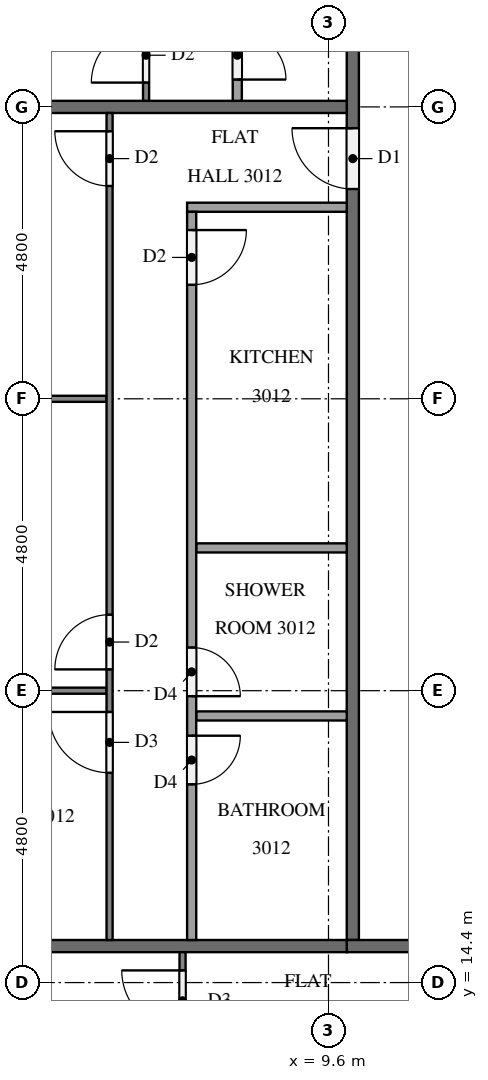
"""IFC4 building model, lengths in metres.
Left out: names, types, materials, properties, quantities, classifications, styles, units other than length and angle.
Written with IfcOpenShell. Run it as: python <this file> out.ifc"""

import sys

from ifc_helpers import new_model, si_unit, direction, frame, frame_2d, origin, place, context, subcontext, project, spatial, rectangle, extrude, element, fill, save


model = new_model("IFC4")
c1 = context("Model", 3, precision=1e-05, world=origin(), true_north=direction((0.0, 1.0)))
c2 = subcontext(c1, "Body", "Model", "MODEL_VIEW")
j1 = project(units=[si_unit("LENGTHUNIT", "METRE"), si_unit("PLANEANGLEUNIT", "RADIAN")], contexts=[c1])
p1 = place(None, origin())
s1 = spatial("IfcSite", under=j1, at=p1, CompositionType="ELEMENT")
p2 = place(p1, origin())
s2 = spatial("IfcBuilding", under=s1, at=p2, CompositionType="ELEMENT")
p3 = place(p2, frame((0.0, 0.0, 119.1)))
s3 = spatial("IfcBuildingStorey", under=s2, at=p3, CompositionType="ELEMENT", Elevation=119.1)
p4 = place(p3, frame((10.0, 15.1, 0.0), z_axis=(0.0, 0.0, 1.0), x_axis=(0.0, 1.0, 0.0)))
e1 = element("IfcWall", 1, at=p4, inside=s3, PredefinedType="PARTITIONING", context=c2, shape_type="SweptSolid", body=[
    extrude(rectangle(XDim=22.6, YDim=0.2, at=frame_2d((11.3, 0.0))), origin(), (0.0, 0.0, 1.0), 3.2),
])
p5 = place(p4, frame((21.35, 0.0, 0.0)))
e2 = element("IfcOpeningElement", 2, at=p5, cuts=e1, PredefinedType="OPENING", context=c2, shape_type="SweptSolid", body=[
    extrude(rectangle(XDim=1.0, YDim=2.1, at=frame_2d((0.5, 1.05))), frame((0.0, 0.11, 0.0), z_axis=(0.0, -1.0, 0.0), x_axis=(1.0, 0.0, 0.0)), (0.0, 0.0, 1.0), 0.22),
])
p6 = place(p4, frame((12.35, 0.0, 0.0)))
e3 = element("IfcOpeningElement", 3, at=p6, cuts=e1, PredefinedType="OPENING", context=c2, shape_type="SweptSolid", body=[
    extrude(rectangle(XDim=1.0, YDim=2.1, at=frame_2d((0.5, 1.05))), frame((0.0, 0.11, 0.0), z_axis=(0.0, -1.0, 0.0), x_axis=(1.0, 0.0, 0.0)), (0.0, 0.0, 1.0), 0.22),
])
p7 = place(p3, frame((9.9, 15.0, 0.0), z_axis=(0.0, 0.0, 1.0), x_axis=(1.0, 0.0, 0.0)))
e4 = element("IfcWall", 4, at=p7, inside=s3, PredefinedType="PARTITIONING", context=c2, shape_type="SweptSolid", body=[
    extrude(rectangle(XDim=2.2, YDim=0.2, at=frame_2d((1.1, 0.0))), origin(), (0.0, 0.0, 1.0), 3.2),
])
p8 = place(p3, frame((0.375, 28.8, 0.0), z_axis=(0.0, 0.0, 1.0), x_axis=(1.0, 0.0, 0.0)))
e5 = element("IfcWall", 5, at=p8, inside=s3, PredefinedType="PARTITIONING", context=c2, shape_type="SweptSolid", body=[
    extrude(rectangle(XDim=9.525, YDim=0.2, at=frame_2d((4.762, 0.0))), origin(), (0.0, 0.0, 1.0), 3.2),
])
p9 = place(p3, frame((0.1, 15.0, 0.0), z_axis=(0.0, 0.0, 1.0), x_axis=(1.0, 0.0, 0.0)))
e6 = element("IfcWall", 6, at=p9, inside=s3, PredefinedType="PARTITIONING", context=c2, shape_type="SweptSolid", body=[
    extrude(rectangle(XDim=9.8, YDim=0.2, at=frame_2d((4.9, 0.0))), origin(), (0.0, 0.0, 1.0), 3.2),
])
p10 = place(p3, frame((6.6, 28.9, 0.0), z_axis=(0.0, 0.0, 1.0), x_axis=(0.0, 1.0, 0.0)))
e7 = element("IfcWall", 7, at=p10, inside=s3, PredefinedType="PARTITIONING", context=c2, shape_type="SweptSolid", body=[
    extrude(rectangle(XDim=8.8, YDim=0.1, at=frame_2d((4.4, 0.0))), origin(), (0.0, 0.0, 1.0), 3.2),
])
p11 = place(p10, frame((7.5, 0.0, 0.0)))
e8 = element("IfcOpeningElement", 8, at=p11, cuts=e7, PredefinedType="OPENING", context=c2, shape_type="SweptSolid", body=[
    extrude(rectangle(XDim=1.0, YDim=2.1, at=frame_2d((0.5, 1.05))), frame((0.0, 0.06, 0.0), z_axis=(0.0, -1.0, 0.0), x_axis=(1.0, 0.0, 0.0)), (0.0, 0.0, 1.0), 0.12),
])
p12 = place(p10, frame((0.3, 0.0, 0.0)))
e9 = element("IfcOpeningElement", 9, at=p12, cuts=e7, PredefinedType="OPENING", context=c2, shape_type="SweptSolid", body=[
    extrude(rectangle(XDim=0.9, YDim=2.1, at=frame_2d((0.45, 1.05))), frame((0.0, 0.06, 0.0), z_axis=(0.0, -1.0, 0.0), x_axis=(1.0, 0.0, 0.0)), (0.0, 0.0, 1.0), 0.12),
])
p13 = place(p3, frame((8.1, 36.075, 0.0), z_axis=(0.0, 0.0, 1.0), x_axis=(0.0, -1.0, 0.0)))
e10 = element("IfcWall", 10, at=p13, inside=s3, PredefinedType="PARTITIONING", context=c2, shape_type="SweptSolid", body=[
    extrude(rectangle(XDim=7.175, YDim=0.15, at=frame_2d((3.587, 0.0))), origin(), (0.0, 0.0, 1.0), 3.2),
])
p14 = place(p13, frame((0.3, 0.0, 0.0)))
e11 = element("IfcOpeningElement", 11, at=p14, cuts=e10, PredefinedType="OPENING", context=c2, shape_type="SweptSolid", body=[
    extrude(rectangle(XDim=0.9, YDim=2.1, at=frame_2d((0.45, 1.05))), frame((0.0, 0.085, 0.0), z_axis=(0.0, -1.0, 0.0), x_axis=(1.0, 0.0, 0.0)), (0.0, 0.0, 1.0), 0.17),
])
p15 = place(p13, frame((6.025, 0.0, 0.0)))
e12 = element("IfcOpeningElement", 12, at=p15, cuts=e10, PredefinedType="OPENING", context=c2, shape_type="SweptSolid", body=[
    extrude(rectangle(XDim=0.8, YDim=2.1, at=frame_2d((0.4, 1.05))), frame((0.0, 0.085, 0.0), z_axis=(0.0, -1.0, 0.0), x_axis=(1.0, 0.0, 0.0)), (0.0, 0.0, 1.0), 0.17),
])
p16 = place(p3, frame((5.95, 24.0, 0.0), z_axis=(0.0, 0.0, 1.0), x_axis=(-1.0, 0.0, 0.0)))
e13 = element("IfcWall", 13, at=p16, inside=s3, PredefinedType="PARTITIONING", context=c2, shape_type="SweptSolid", body=[
    extrude(rectangle(XDim=5.85, YDim=0.1, at=frame_2d((2.925, 0.0))), origin(), (0.0, 0.0, 1.0), 3.2),
])
p17 = place(p3, frame((5.95, 19.2, 0.0), z_axis=(0.0, 0.0, 1.0), x_axis=(-1.0, 0.0, 0.0)))
e14 = element("IfcWall", 14, at=p17, inside=s3, PredefinedType="PARTITIONING", context=c2, shape_type="SweptSolid", body=[
    extrude(rectangle(XDim=5.575, YDim=0.1, at=frame_2d((2.788, 0.0))), origin(), (0.0, 0.0, 1.0), 3.2),
])
p18 = place(p3, frame((6.0, 15.1, 0.0), z_axis=(0.0, 0.0, 1.0), x_axis=(0.0, 1.0, 0.0)))
e15 = element("IfcWall", 15, at=p18, inside=s3, PredefinedType="PARTITIONING", context=c2, shape_type="SweptSolid", body=[
    extrude(rectangle(XDim=13.6, YDim=0.1, at=frame_2d((6.8, 0.0))), origin(), (0.0, 0.0, 1.0), 3.2),
])
p19 = place(p18, frame((12.4, 0.0, 0.0)))
e16 = element("IfcOpeningElement", 16, at=p19, cuts=e15, PredefinedType="OPENING", context=c2, shape_type="SweptSolid", body=[
    extrude(rectangle(XDim=0.9, YDim=2.1, at=frame_2d((0.45, 1.05))), frame((0.0, 0.06, 0.0), z_axis=(0.0, -1.0, 0.0), x_axis=(1.0, 0.0, 0.0)), (0.0, 0.0, 1.0), 0.12),
])
p20 = place(p18, frame((4.45, 0.0, 0.0)))
e17 = element("IfcOpeningElement", 17, at=p20, cuts=e15, PredefinedType="OPENING", context=c2, shape_type="SweptSolid", body=[
    extrude(rectangle(XDim=0.9, YDim=2.1, at=frame_2d((0.45, 1.05))), frame((0.0, 0.06, 0.0), z_axis=(0.0, -1.0, 0.0), x_axis=(1.0, 0.0, 0.0)), (0.0, 0.0, 1.0), 0.12),
])
p21 = place(p18, frame((2.75, 0.0, 0.0)))
e18 = element("IfcOpeningElement", 18, at=p21, cuts=e15, PredefinedType="OPENING", context=c2, shape_type="SweptSolid", body=[
    extrude(rectangle(XDim=1.0, YDim=2.1, at=frame_2d((0.5, 1.05))), frame((0.0, 0.06, 0.0), z_axis=(0.0, -1.0, 0.0), x_axis=(1.0, 0.0, 0.0)), (0.0, 0.0, 1.0), 0.12),
])
for number, where, z_axis, x_axis in (
    (19, (9.9, 21.548, 0.0), (0.0, 0.0, 1.0), (-1.0, 0.0, 0.0)),
    (20, (9.9, 18.785, 0.0), (0.0, 0.0, 1.0), (-1.0, 0.0, 0.0)),
):
    element("IfcWall", number, at=place(p3, frame(where, z_axis=z_axis, x_axis=x_axis)), inside=s3, PredefinedType="PARTITIONING", context=c2, shape_type="SweptSolid", body=[
        extrude(rectangle(XDim=2.475, YDim=0.15, at=frame_2d((1.237, 0.0))), origin(), (0.0, 0.0, 1.0), 3.2),
    ])
p22 = place(p3, frame((9.9, 27.15, 0.0), z_axis=(0.0, 0.0, 1.0), x_axis=(-1.0, 0.0, 0.0)))
e21 = element("IfcWall", 21, at=p22, inside=s3, PredefinedType="PARTITIONING", context=c2, shape_type="SweptSolid", body=[
    extrude(rectangle(XDim=2.625, YDim=0.15, at=frame_2d((1.312, 0.0))), origin(), (0.0, 0.0, 1.0), 3.2),
])
p23 = place(p3, frame((7.35, 27.075, 0.0), z_axis=(0.0, 0.0, 1.0), x_axis=(0.0, -1.0, 0.0)))
e22 = element("IfcWall", 22, at=p23, inside=s3, PredefinedType="PARTITIONING", context=c2, shape_type="SweptSolid", body=[
    extrude(rectangle(XDim=11.975, YDim=0.15, at=frame_2d((5.987, 0.0))), origin(), (0.0, 0.0, 1.0), 3.2),
])
p24 = place(p23, frame((0.3, 0.0, 0.0)))
e23 = element("IfcOpeningElement", 23, at=p24, cuts=e22, PredefinedType="OPENING", context=c2, shape_type="SweptSolid", body=[
    extrude(rectangle(XDim=0.9, YDim=2.1, at=frame_2d((0.45, 1.05))), frame((0.0, 0.085, 0.0), z_axis=(0.0, -1.0, 0.0), x_axis=(1.0, 0.0, 0.0)), (0.0, 0.0, 1.0), 0.17),
])
p25 = place(p23, frame((7.165, 0.0, 0.0)))
e24 = element("IfcOpeningElement", 24, at=p25, cuts=e22, PredefinedType="OPENING", context=c2, shape_type="SweptSolid", body=[
    extrude(rectangle(XDim=0.8, YDim=2.1, at=frame_2d((0.4, 1.05))), frame((0.0, 0.085, 0.0), z_axis=(0.0, -1.0, 0.0), x_axis=(1.0, 0.0, 0.0)), (0.0, 0.0, 1.0), 0.17),
])
p26 = place(p23, frame((8.615, 0.0, 0.0)))
e25 = element("IfcOpeningElement", 25, at=p26, cuts=e22, PredefinedType="OPENING", context=c2, shape_type="SweptSolid", body=[
    extrude(rectangle(XDim=0.8, YDim=2.1, at=frame_2d((0.4, 1.05))), frame((0.0, 0.085, 0.0), z_axis=(0.0, -1.0, 0.0), x_axis=(1.0, 0.0, 0.0)), (0.0, 0.0, 1.0), 0.17),
])
p27 = place(p3, frame((7.2, 4.9, 0.0), z_axis=(0.0, 0.0, 1.0), x_axis=(0.0, 1.0, 0.0)))
e26 = element("IfcWall", 26, at=p27, inside=s3, PredefinedType="PARTITIONING", context=c2, shape_type="SweptSolid", body=[
    extrude(rectangle(XDim=10.0, YDim=0.1, at=frame_2d((5.0, 0.0))), origin(), (0.0, 0.0, 1.0), 3.2),
])
p28 = place(p27, frame((8.7, 0.0, 0.0)))
e27 = element("IfcOpeningElement", 27, at=p28, cuts=e26, PredefinedType="OPENING", context=c2, shape_type="SweptSolid", body=[
    extrude(rectangle(XDim=1.0, YDim=2.1, at=frame_2d((0.5, 1.05))), frame((0.0, 0.06, 0.0), z_axis=(0.0, -1.0, 0.0), x_axis=(1.0, 0.0, 0.0)), (0.0, 0.0, 1.0), 0.12),
])
p29 = place(p27, frame((0.3, 0.0, 0.0)))
e28 = element("IfcOpeningElement", 28, at=p29, cuts=e26, PredefinedType="OPENING", context=c2, shape_type="SweptSolid", body=[
    extrude(rectangle(XDim=0.9, YDim=2.1, at=frame_2d((0.45, 1.05))), frame((0.0, 0.06, 0.0), z_axis=(0.0, -1.0, 0.0), x_axis=(1.0, 0.0, 0.0)), (0.0, 0.0, 1.0), 0.12),
])
p30 = place(p6, origin())
e29 = element("IfcDoor", 29, at=p30, inside=s3, OperationType="SINGLE_SWING_RIGHT", PredefinedType="DOOR", context=c2, shape_type="SweptSolid", body=[
    extrude(rectangle(XDim=1.0, YDim=2.1, at=frame_2d((0.5, 1.05))), frame((0.0, 0.025, 0.0), z_axis=(0.0, -1.0, 0.0), x_axis=(1.0, 0.0, 0.0)), (0.0, 0.0, 1.0), 0.05),
])
fill(e3, e29)
p31 = place(p12, origin())
e30 = element("IfcDoor", 30, at=p31, inside=s3, OperationType="SINGLE_SWING_LEFT", PredefinedType="DOOR", context=c2, shape_type="SweptSolid", body=[
    extrude(rectangle(XDim=0.9, YDim=2.1, at=frame_2d((0.45, 1.05))), frame((0.0, 0.025, 0.0), z_axis=(0.0, -1.0, 0.0), x_axis=(1.0, 0.0, 0.0)), (0.0, 0.0, 1.0), 0.05),
])
fill(e9, e30)
p32 = place(p15, origin())
e31 = element("IfcDoor", 31, at=p32, inside=s3, OperationType="SINGLE_SWING_RIGHT", PredefinedType="DOOR", context=c2, shape_type="SweptSolid", body=[
    extrude(rectangle(XDim=0.8, YDim=2.1, at=frame_2d((0.4, 1.05))), frame((0.0, 0.025, 0.0), z_axis=(0.0, -1.0, 0.0), x_axis=(1.0, 0.0, 0.0)), (0.0, 0.0, 1.0), 0.05),
])
fill(e12, e31)
p33 = place(p19, origin())
e32 = element("IfcDoor", 32, at=p33, inside=s3, OperationType="SINGLE_SWING_RIGHT", PredefinedType="DOOR", context=c2, shape_type="SweptSolid", body=[
    extrude(rectangle(XDim=0.9, YDim=2.1, at=frame_2d((0.45, 1.05))), frame((0.0, 0.025, 0.0), z_axis=(0.0, -1.0, 0.0), x_axis=(1.0, 0.0, 0.0)), (0.0, 0.0, 1.0), 0.05),
])
fill(e16, e32)
p34 = place(p20, origin())
e33 = element("IfcDoor", 33, at=p34, inside=s3, OperationType="SINGLE_SWING_LEFT", PredefinedType="DOOR", context=c2, shape_type="SweptSolid", body=[
    extrude(rectangle(XDim=0.9, YDim=2.1, at=frame_2d((0.45, 1.05))), frame((0.0, 0.025, 0.0), z_axis=(0.0, -1.0, 0.0), x_axis=(1.0, 0.0, 0.0)), (0.0, 0.0, 1.0), 0.05),
])
fill(e17, e33)
p35 = place(p21, origin())
e34 = element("IfcDoor", 34, at=p35, inside=s3, OperationType="SINGLE_SWING_RIGHT", PredefinedType="DOOR", context=c2, shape_type="SweptSolid", body=[
    extrude(rectangle(XDim=1.0, YDim=2.1, at=frame_2d((0.5, 1.05))), frame((0.0, 0.025, 0.0), z_axis=(0.0, -1.0, 0.0), x_axis=(1.0, 0.0, 0.0)), (0.0, 0.0, 1.0), 0.05),
])
fill(e18, e34)
p36 = place(p24, origin())
e35 = element("IfcDoor", 35, at=p36, inside=s3, OperationType="SINGLE_SWING_LEFT", PredefinedType="DOOR", context=c2, shape_type="SweptSolid", body=[
    extrude(rectangle(XDim=0.9, YDim=2.1, at=frame_2d((0.45, 1.05))), frame((0.0, 0.025, 0.0), z_axis=(0.0, -1.0, 0.0), x_axis=(1.0, 0.0, 0.0)), (0.0, 0.0, 1.0), 0.05),
])
fill(e23, e35)
p37 = place(p25, origin())
e36 = element("IfcDoor", 36, at=p37, inside=s3, OperationType="SINGLE_SWING_RIGHT", PredefinedType="DOOR", context=c2, shape_type="SweptSolid", body=[
    extrude(rectangle(XDim=0.8, YDim=2.1, at=frame_2d((0.4, 1.05))), frame((0.0, 0.025, 0.0), z_axis=(0.0, -1.0, 0.0), x_axis=(1.0, 0.0, 0.0)), (0.0, 0.0, 1.0), 0.05),
])
fill(e24, e36)
p38 = place(p26, origin())
e37 = element("IfcDoor", 37, at=p38, inside=s3, OperationType="SINGLE_SWING_LEFT", PredefinedType="DOOR", context=c2, shape_type="SweptSolid", body=[
    extrude(rectangle(XDim=0.8, YDim=2.1, at=frame_2d((0.4, 1.05))), frame((0.0, 0.025, 0.0), z_axis=(0.0, -1.0, 0.0), x_axis=(1.0, 0.0, 0.0)), (0.0, 0.0, 1.0), 0.05),
])
fill(e25, e37)
p39 = place(p28, origin())
e38 = element("IfcDoor", 38, at=p39, inside=s3, OperationType="SINGLE_SWING_RIGHT", PredefinedType="DOOR", context=c2, shape_type="SweptSolid", body=[
    extrude(rectangle(XDim=1.0, YDim=2.1, at=frame_2d((0.5, 1.05))), frame((0.0, 0.025, 0.0), z_axis=(0.0, -1.0, 0.0), x_axis=(1.0, 0.0, 0.0)), (0.0, 0.0, 1.0), 0.05),
])
fill(e27, e38)
save(model, sys.argv[1])
